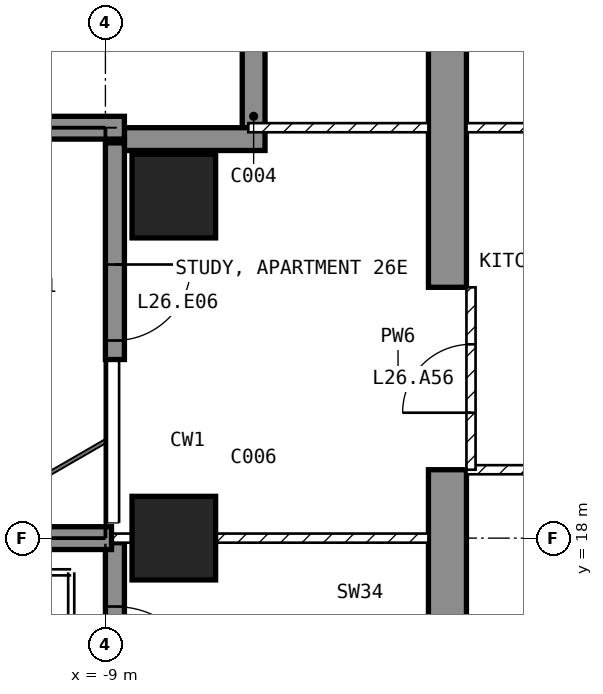
"""IFC4 building model, lengths in metres.
Left out: names, types, materials, properties, quantities, classifications, styles, units other than length and angle.
Written with IfcOpenShell. Run it as: python <this file> out.ifc"""

import sys

from ifc_helpers import new_model, si_unit, direction, frame, frame_2d, origin, origin_2d, place, context, subcontext, project, spatial, polyline, rectangle, outline, extrude, element, fill, save


model = new_model("IFC4")
c1 = context("Model", 3, precision=1e-05, world=origin(), true_north=direction((0.0, 1.0)))
c2 = subcontext(c1, "Body", "Model", "MODEL_VIEW")
j1 = project(units=[si_unit("LENGTHUNIT", "METRE"), si_unit("PLANEANGLEUNIT", "RADIAN")], contexts=[c1])
p1 = place(None, origin())
s1 = spatial("IfcSite", under=j1, at=p1, CompositionType="ELEMENT")
p2 = place(p1, origin())
s2 = spatial("IfcBuilding", under=s1, at=p2, CompositionType="ELEMENT")
p3 = place(p2, frame((0.0, 0.0, 112.9)))
s3 = spatial("IfcBuildingStorey", under=s2, at=p3, CompositionType="ELEMENT", Elevation=112.9)
for number, where, z_axis, x_axis in (
    (1, (-8.1, 18.0, -0.25), (0.0, 0.0, 1.0), (1.0, 0.0, 0.0)),
    (2, (-8.1, 22.5, -0.25), (0.0, 0.0, 1.0), (1.0, 0.0, 0.0)),
):
    element("IfcColumn", number, at=place(p3, frame(where, z_axis=z_axis, x_axis=x_axis)), inside=s3, PredefinedType="COLUMN", context=c2, shape_type="SweptSolid", body=[
        extrude(rectangle(XDim=1.1, YDim=1.1, at=origin_2d()), origin(), (0.0, 0.0, 1.0), 3.5),
    ])
p4 = place(p3, frame((-4.75, 9.0, -0.25), z_axis=(1.0, 0.0, 0.0), x_axis=(0.0, 1.0, 0.0)))
e3 = element("IfcWall", 3, at=p4, inside=s3, PredefinedType="SHEAR", context=c2, shape_type="SweptSolid", body=[
    extrude(outline(polyline([(0.0, 0.0), (2.1, 0.0), (2.1, 2.65), (4.5, 2.65), (4.5, 0.0), (9.9, 0.0), (9.9, 2.65), (12.3, 2.65), (12.3, 0.0), (16.55, 0.0), (16.55, 3.5), (0.0, 3.5), (0.0, 0.0)])), origin(), (0.0, 0.0, 1.0), 0.5),
])
p5 = place(p3, frame((-8.875, 23.2, 0.0), z_axis=(0.0, 0.0, 1.0), x_axis=(0.0, -1.0, 0.0)))
e4 = element("IfcWall", 4, at=p5, inside=s3, PredefinedType="SOLIDWALL", context=c2, shape_type="SweptSolid", body=[
    extrude(rectangle(XDim=2.85, YDim=0.25, at=frame_2d((1.425, 0.0))), origin(), (0.0, 0.0, 1.0), 3.25),
])
p6 = place(p5, frame((1.6, 0.0, 0.0)))
e5 = element("IfcOpeningElement", 5, at=p6, cuts=e4, PredefinedType="OPENING", context=c2, shape_type="SweptSolid", body=[
    extrude(rectangle(XDim=1.0, YDim=2.4, at=frame_2d((0.5, 1.2))), frame((0.0, 0.135, 0.0), z_axis=(0.0, -1.0, 0.0), x_axis=(1.0, 0.0, 0.0)), (0.0, 0.0, 1.0), 0.27),
])
p7 = place(p3, frame((-8.875, 17.94, 0.0), z_axis=(0.0, 0.0, 1.0), x_axis=(0.0, -1.0, 0.0)))
e6 = element("IfcWall", 6, at=p7, inside=s3, PredefinedType="SOLIDWALL", context=c2, shape_type="SweptSolid", body=[
    extrude(rectangle(XDim=2.29, YDim=0.25, at=frame_2d((1.145, 0.0))), origin(), (0.0, 0.0, 1.0), 3.25),
])
p8 = place(p7, frame((0.84, 0.0, 0.0)))
e7 = element("IfcOpeningElement", 7, at=p8, cuts=e6, PredefinedType="OPENING", context=c2, shape_type="SweptSolid", body=[
    extrude(rectangle(XDim=1.2, YDim=2.4, at=frame_2d((0.6, 1.2))), frame((0.0, 0.135, 0.0), z_axis=(0.0, -1.0, 0.0), x_axis=(1.0, 0.0, 0.0)), (0.0, 0.0, 1.0), 0.27),
])
p9 = place(p3, frame((-7.05, 25.2, 0.0), z_axis=(0.0, 0.0, 1.0), x_axis=(0.0, -1.0, 0.0)))
e8 = element("IfcWall", 8, at=p9, inside=s3, PredefinedType="SOLIDWALL", context=c2, shape_type="SweptSolid", body=[
    extrude(rectangle(XDim=1.8, YDim=0.3, at=frame_2d((0.9, 0.0))), origin(), (0.0, 0.0, 1.0), 3.25),
])
p10 = place(p3, frame((-6.9, 23.25, 0.0), z_axis=(0.0, 0.0, 1.0), x_axis=(-1.0, 0.0, 0.0)))
e9 = element("IfcWall", 9, at=p10, inside=s3, PredefinedType="SOLIDWALL", context=c2, shape_type="SweptSolid", body=[
    extrude(rectangle(XDim=1.85, YDim=0.3, at=frame_2d((0.925, 0.0))), origin(), (0.0, 0.0, 1.0), 3.25),
])
p11 = place(p3, frame((-8.92, 18.0, 0.0), z_axis=(0.0, 0.0, 1.0), x_axis=(-1.0, 0.0, 0.0)))
e10 = element("IfcWall", 10, at=p11, inside=s3, PredefinedType="SOLIDWALL", context=c2, shape_type="SweptSolid", body=[
    extrude(rectangle(XDim=2.82, YDim=0.3, at=frame_2d((1.41, 0.0))), origin(), (0.0, 0.0, 1.0), 3.25),
])
p12 = place(p3, frame((-8.75, 23.4, 0.0), z_axis=(0.0, 0.0, 1.0), x_axis=(-1.0, 0.0, 0.0)))
e11 = element("IfcWall", 11, at=p12, inside=s3, PredefinedType="SOLIDWALL", context=c2, shape_type="SweptSolid", body=[
    extrude(rectangle(XDim=2.95, YDim=0.3, at=frame_2d((1.475, 0.0))), origin(), (0.0, 0.0, 1.0), 3.25),
])
p13 = place(p3, frame((-4.25, 18.9, 0.0), z_axis=(0.0, 0.0, 1.0), x_axis=(1.0, 0.0, 0.0)))
e12 = element("IfcWall", 12, at=p13, inside=s3, PredefinedType="PARTITIONING", context=c2, shape_type="SweptSolid", body=[
    extrude(rectangle(XDim=8.5, YDim=0.12, at=frame_2d((4.25, 0.0))), origin(), (0.0, 0.0, 1.0), 3.25),
])
p14 = place(p13, frame((5.675, 0.0, 0.0)))
e13 = element("IfcOpeningElement", 13, at=p14, cuts=e12, PredefinedType="OPENING", context=c2, shape_type="SweptSolid", body=[
    extrude(rectangle(XDim=0.9, YDim=2.1, at=frame_2d((0.45, 1.05))), frame((0.0, 0.07, 0.0), z_axis=(0.0, -1.0, 0.0), x_axis=(1.0, 0.0, 0.0)), (0.0, 0.0, 1.0), 0.14),
])
p15 = place(p3, frame((-4.25, 23.4, 0.0), z_axis=(0.0, 0.0, 1.0), x_axis=(1.0, 0.0, 0.0)))
e14 = element("IfcWall", 14, at=p15, inside=s3, PredefinedType="PARTITIONING", context=c2, shape_type="SweptSolid", body=[
    extrude(rectangle(XDim=8.5, YDim=0.12, at=frame_2d((4.25, 0.0))), origin(), (0.0, 0.0, 1.0), 3.25),
])
p16 = place(p15, frame((5.675, 0.0, 0.0)))
e15 = element("IfcOpeningElement", 15, at=p16, cuts=e14, PredefinedType="OPENING", context=c2, shape_type="SweptSolid", body=[
    extrude(rectangle(XDim=0.9, YDim=2.1, at=frame_2d((0.45, 1.05))), frame((0.0, 0.07, 0.0), z_axis=(0.0, -1.0, 0.0), x_axis=(1.0, 0.0, 0.0)), (0.0, 0.0, 1.0), 0.14),
])
p17 = place(p3, frame((-8.92, 18.0, 0.0), z_axis=(0.0, 0.0, 1.0), x_axis=(1.0, 0.0, 0.0)))
e16 = element("IfcWall", 16, at=p17, inside=s3, PredefinedType="PARTITIONING", context=c2, shape_type="SweptSolid", body=[
    extrude(rectangle(XDim=4.17, YDim=0.12, at=frame_2d((2.085, 0.0))), origin(), (0.0, 0.0, 1.0), 2.414),
])
p18 = place(p3, frame((-7.12, 23.4, 0.0), z_axis=(0.0, 0.0, 1.0), x_axis=(1.0, 0.0, 0.0)))
e17 = element("IfcWall", 17, at=p18, inside=s3, PredefinedType="PARTITIONING", context=c2, shape_type="SweptSolid", body=[
    extrude(rectangle(XDim=2.37, YDim=0.12, at=frame_2d((1.185, 0.0))), origin(), (0.0, 0.0, 1.0), 3.25),
])
p19 = place(p3, frame((-4.19, 18.9, 0.0), z_axis=(0.0, 0.0, 1.0), x_axis=(0.0, 1.0, 0.0)))
e18 = element("IfcWall", 18, at=p19, inside=s3, PredefinedType="PARTITIONING", context=c2, shape_type="SweptSolid", body=[
    extrude(rectangle(XDim=2.4, YDim=0.12, at=frame_2d((1.2, 0.0))), origin(), (0.0, 0.0, 1.0), 2.4),
])
p20 = place(p19, frame((0.75, 0.0, 0.0)))
e19 = element("IfcOpeningElement", 19, at=p20, cuts=e18, PredefinedType="OPENING", context=c2, shape_type="SweptSolid", body=[
    extrude(rectangle(XDim=0.9, YDim=2.1, at=frame_2d((0.45, 1.05))), frame((0.0, 0.07, 0.0), z_axis=(0.0, -1.0, 0.0), x_axis=(1.0, 0.0, 0.0)), (0.0, 0.0, 1.0), 0.14),
])
p21 = place(p6, origin())
e20 = element("IfcDoor", 20, at=p21, inside=s3, OperationType="SINGLE_SWING_LEFT", PredefinedType="DOOR", context=c2, shape_type="SweptSolid", body=[
    extrude(rectangle(XDim=1.0, YDim=2.4, at=frame_2d((0.5, 1.2))), frame((0.0, 0.025, 0.0), z_axis=(0.0, -1.0, 0.0), x_axis=(1.0, 0.0, 0.0)), (0.0, 0.0, 1.0), 0.05),
])
fill(e5, e20)
p22 = place(p8, origin())
e21 = element("IfcDoor", 21, at=p22, inside=s3, OperationType="SINGLE_SWING_RIGHT", PredefinedType="DOOR", context=c2, shape_type="SweptSolid", body=[
    extrude(rectangle(XDim=1.2, YDim=2.4, at=frame_2d((0.6, 1.2))), frame((0.0, 0.025, 0.0), z_axis=(0.0, -1.0, 0.0), x_axis=(1.0, 0.0, 0.0)), (0.0, 0.0, 1.0), 0.05),
])
fill(e7, e21)
p23 = place(p20, origin())
e22 = element("IfcDoor", 22, at=p23, inside=s3, OperationType="SINGLE_SWING_LEFT", PredefinedType="DOOR", context=c2, shape_type="SweptSolid", body=[
    extrude(rectangle(XDim=0.9, YDim=2.1, at=frame_2d((0.45, 1.05))), frame((0.0, 0.025, 0.0), z_axis=(0.0, -1.0, 0.0), x_axis=(1.0, 0.0, 0.0)), (0.0, 0.0, 1.0), 0.05),
])
fill(e19, e22)
save(model, sys.argv[1])
